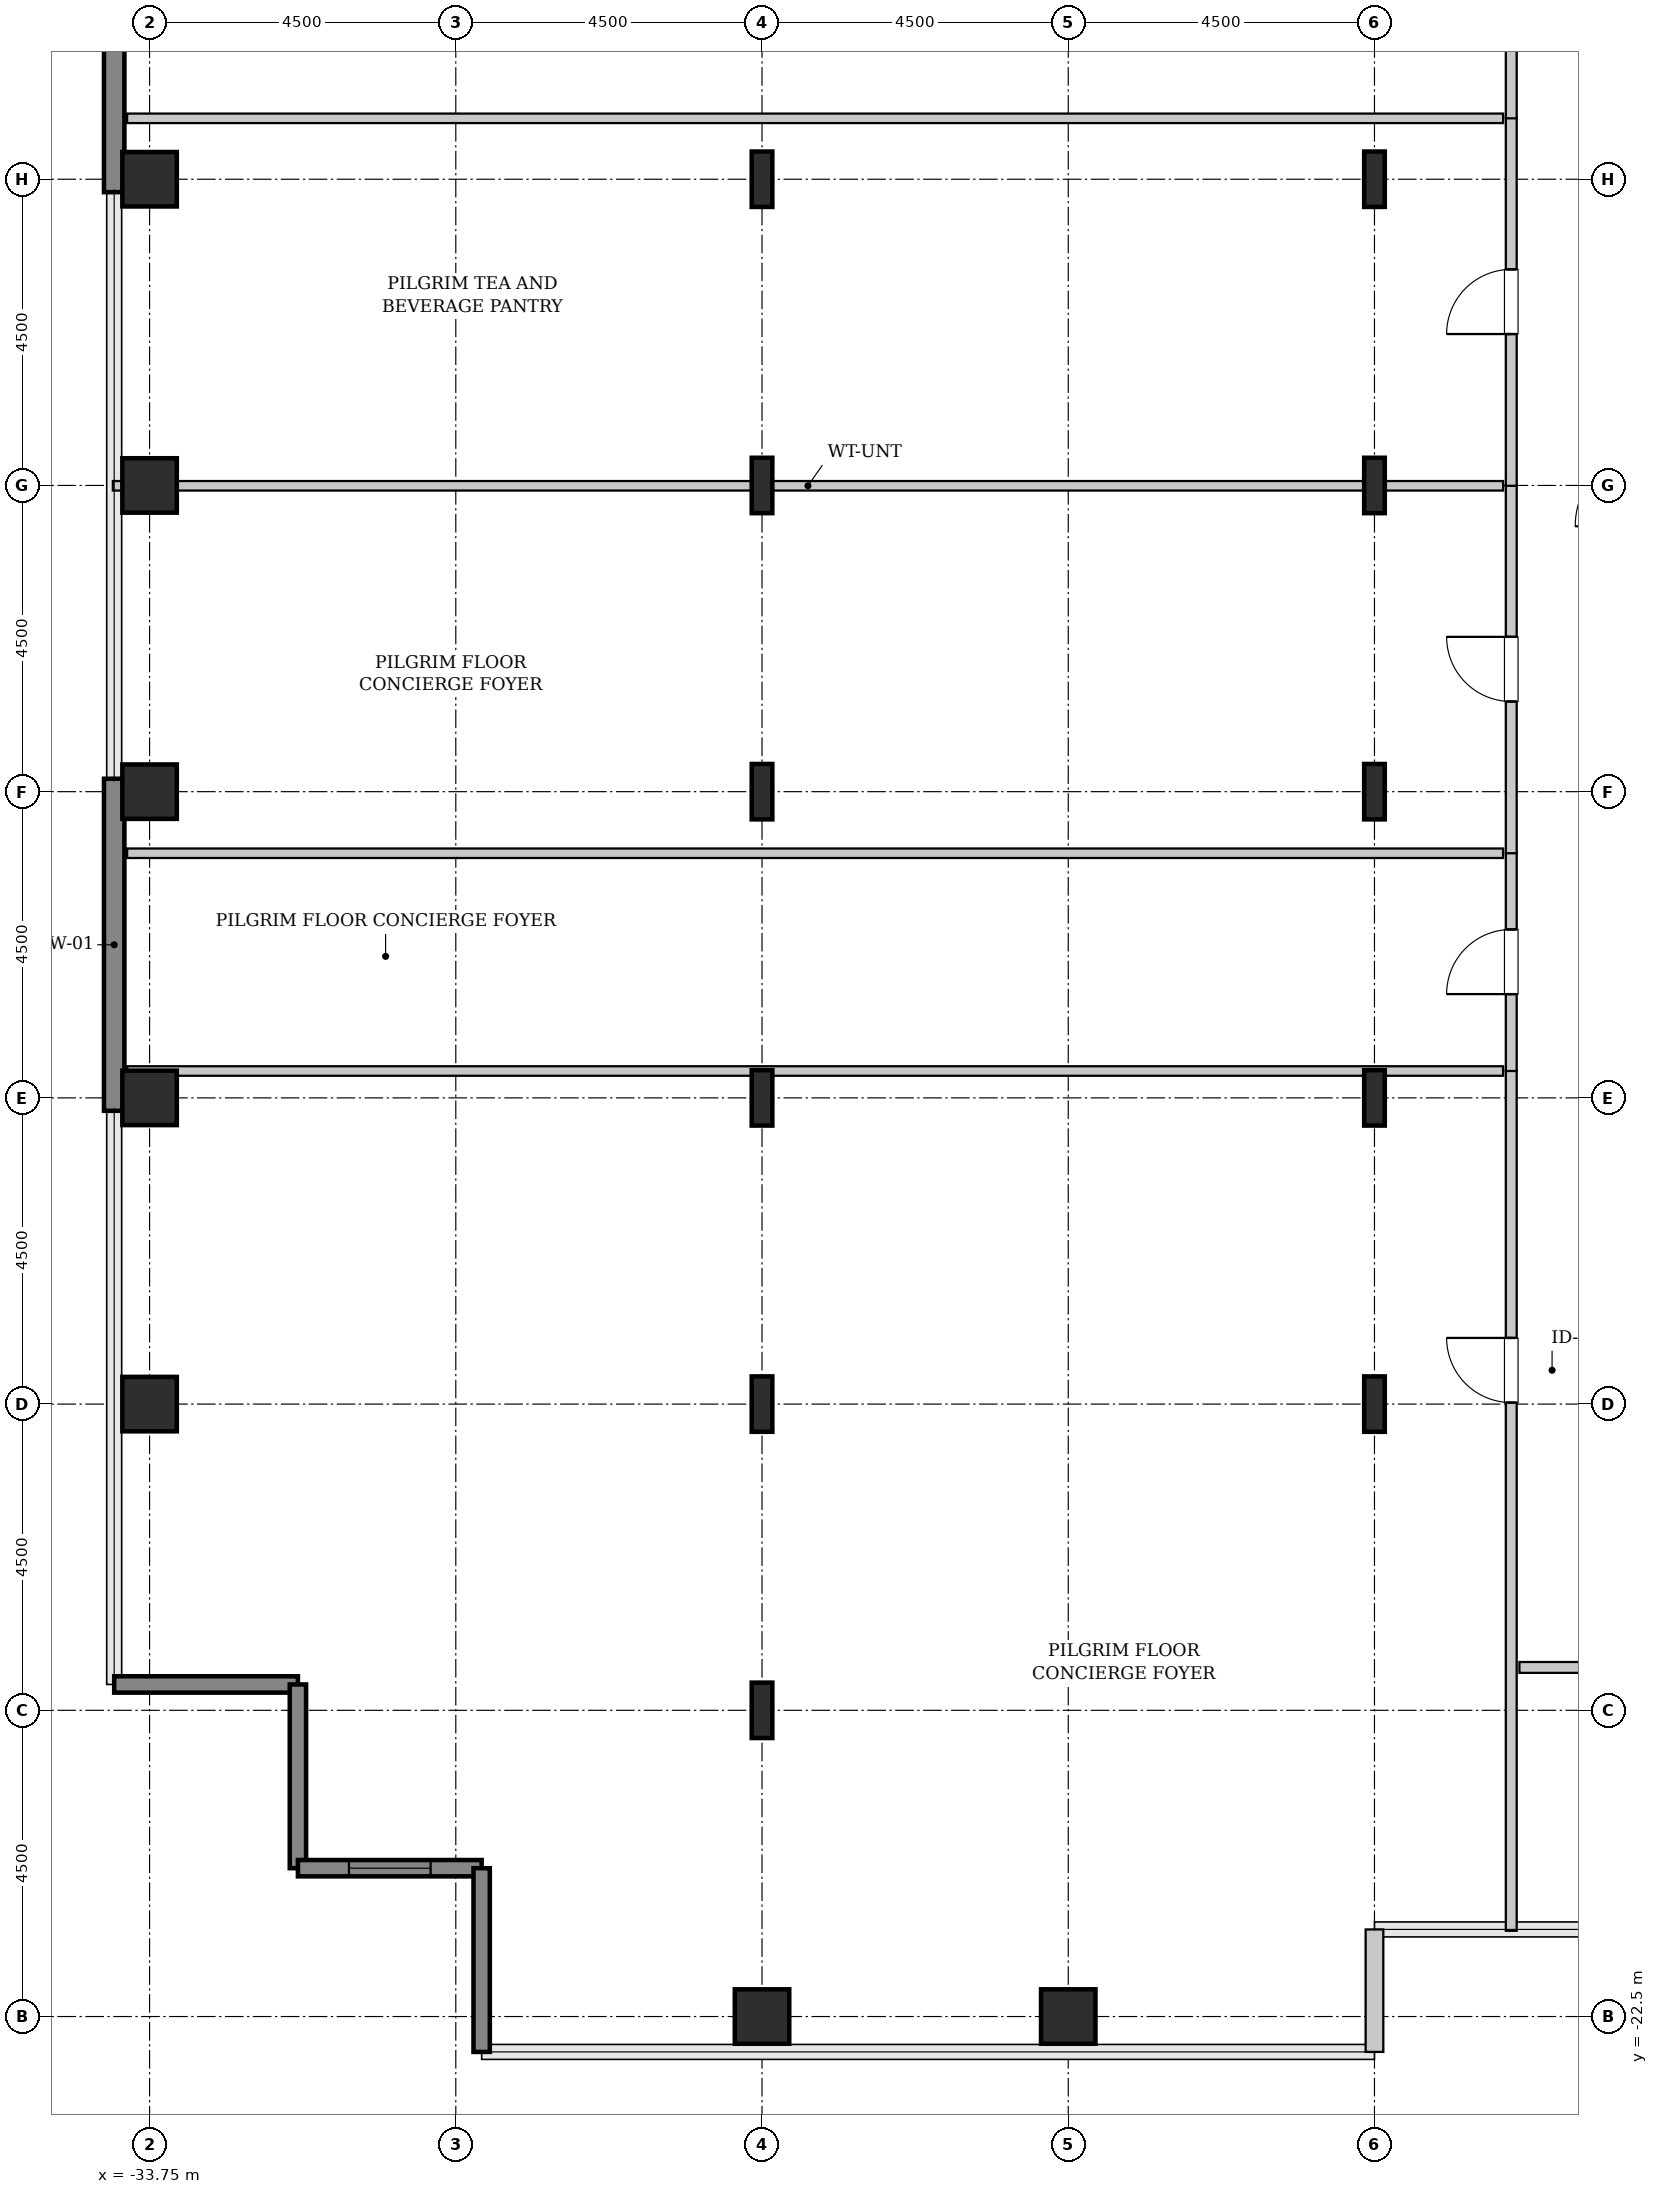
"""IFC4 building model, lengths in metres.
Left out: names, types, materials, properties, quantities, classifications, styles, units other than length and angle.
Written with IfcOpenShell. Run it as: python <this file> out.ifc"""

import sys

from ifc_helpers import new_model, si_unit, direction, frame, frame_2d, origin, origin_2d, place, context, subcontext, project, spatial, rectangle, hollow_rectangle, i_section, extrude, source, transform, mapped, element, fill, save


model = new_model("IFC4")
c1 = context("Model", 3, precision=1e-05, world=origin(), true_north=direction((0.0, 1.0)))
c2 = subcontext(c1, "Body", "Model", "MODEL_VIEW")
j1 = project(units=[si_unit("LENGTHUNIT", "METRE"), si_unit("PLANEANGLEUNIT", "RADIAN")], contexts=[c1])
p1 = place(None, origin())
s1 = spatial("IfcSite", under=j1, at=p1, CompositionType="ELEMENT")
p2 = place(p1, origin())
s2 = spatial("IfcBuilding", under=s1, at=p2, CompositionType="ELEMENT")
p3 = place(p2, frame((0.0, 0.0, 183.0)))
s3 = spatial("IfcBuildingStorey", under=s2, at=p3, CompositionType="ELEMENT", Elevation=183.0)
m1 = source(origin(), c2, "Body", "SweptSolid", [
    extrude(hollow_rectangle(XDim=0.8, YDim=0.8, WallThickness=0.04, InnerFilletRadius=0.04, OuterFilletRadius=0.08, at=origin_2d()), origin(), (0.0, 0.0, 1.0), 3.8),
])
for number, where, z_axis, x_axis in (
    (1, (-33.75, -13.5, 0.0), (0.0, 0.0, 1.0), (1.0, 0.0, 0.0)),
    (2, (-33.75, -9.0, 0.0), (0.0, 0.0, 1.0), (1.0, 0.0, 0.0)),
    (3, (-33.75, -4.5, 0.0), (0.0, 0.0, 1.0), (1.0, 0.0, 0.0)),
    (4, (-33.75, 0.0, 0.0), (0.0, 0.0, 1.0), (1.0, 0.0, 0.0)),
    (5, (-33.75, 4.5, 0.0), (0.0, 0.0, 1.0), (1.0, 0.0, 0.0)),
    (6, (-24.75, -22.5, 0.0), (0.0, 0.0, 1.0), (1.0, 0.0, 0.0)),
):
    element("IfcColumn", number, at=place(p3, frame(where, z_axis=z_axis, x_axis=x_axis)), inside=s3, PredefinedType="COLUMN", context=c2, shape_type="MappedRepresentation", body=[
        mapped(m1, transform((0.0, 0.0, 0.0), x_axis=(1.0, 0.0, 0.0), y_axis=(0.0, 1.0, 0.0), z_axis=(0.0, 0.0, 1.0), scale=1.0)),
    ])
m2 = source(origin(), c2, "Body", "SweptSolid", [
    extrude(i_section(OverallWidth=0.303, OverallDepth=0.814, WebThickness=0.021, FlangeThickness=0.04, FilletRadius=0.03, at=origin_2d()), origin(), (0.0, 0.0, 1.0), 3.8),
])
for number, where, z_axis, x_axis in (
    (7, (-24.75, -18.0, 0.0), (0.0, 0.0, 1.0), (1.0, 0.0, 0.0)),
    (8, (-24.75, -13.5, 0.0), (0.0, 0.0, 1.0), (1.0, 0.0, 0.0)),
    (9, (-24.75, -9.0, 0.0), (0.0, 0.0, 1.0), (1.0, 0.0, 0.0)),
    (10, (-24.75, -4.5, 0.0), (0.0, 0.0, 1.0), (1.0, 0.0, 0.0)),
    (11, (-24.75, 0.0, 0.0), (0.0, 0.0, 1.0), (1.0, 0.0, 0.0)),
    (12, (-24.75, 4.5, 0.0), (0.0, 0.0, 1.0), (1.0, 0.0, 0.0)),
):
    element("IfcColumn", number, at=place(p3, frame(where, z_axis=z_axis, x_axis=x_axis)), inside=s3, PredefinedType="COLUMN", context=c2, shape_type="MappedRepresentation", body=[
        mapped(m2, transform((0.0, 0.0, 0.0), x_axis=(1.0, 0.0, 0.0), y_axis=(0.0, 1.0, 0.0), z_axis=(0.0, 0.0, 1.0), scale=1.0)),
    ])
p4 = place(p3, frame((-20.25, -22.5, 0.0), z_axis=(0.0, 0.0, 1.0), x_axis=(1.0, 0.0, 0.0)))
e13 = element("IfcColumn", 13, at=p4, inside=s3, PredefinedType="COLUMN", context=c2, shape_type="MappedRepresentation", body=[
    mapped(m1, transform((0.0, 0.0, 0.0), x_axis=(1.0, 0.0, 0.0), y_axis=(0.0, 1.0, 0.0), z_axis=(0.0, 0.0, 1.0), scale=1.0)),
])
for number, where, z_axis, x_axis in (
    (14, (-15.75, -13.5, 0.0), (0.0, 0.0, 1.0), (1.0, 0.0, 0.0)),
    (15, (-15.75, -9.0, 0.0), (0.0, 0.0, 1.0), (1.0, 0.0, 0.0)),
    (16, (-15.75, -4.5, 0.0), (0.0, 0.0, 1.0), (1.0, 0.0, 0.0)),
    (17, (-15.75, 0.0, 0.0), (0.0, 0.0, 1.0), (1.0, 0.0, 0.0)),
    (18, (-15.75, 4.5, 0.0), (0.0, 0.0, 1.0), (1.0, 0.0, 0.0)),
):
    element("IfcColumn", number, at=place(p3, frame(where, z_axis=z_axis, x_axis=x_axis)), inside=s3, PredefinedType="COLUMN", context=c2, shape_type="MappedRepresentation", body=[
        mapped(m2, transform((0.0, 0.0, 0.0), x_axis=(1.0, 0.0, 0.0), y_axis=(0.0, 1.0, 0.0), z_axis=(0.0, 0.0, 1.0), scale=1.0)),
    ])
m3 = source(origin(), c2, "Body", "SweptSolid", [
    extrude(rectangle(XDim=4.88, YDim=0.3, at=frame_2d((2.44, 0.0))), origin(), (0.0, 0.0, 1.0), 3.55),
])
for number, where, z_axis, x_axis in (
    (19, (-34.27, -9.19, 0.0), (0.0, 0.0, 1.0), (0.0, 1.0, 0.0)),
    (20, (-34.27, 4.31, 0.0), (0.0, 0.0, 1.0), (0.0, 1.0, 0.0)),
):
    element("IfcWall", number, at=place(p3, frame(where, z_axis=z_axis, x_axis=x_axis)), inside=s3, PredefinedType="SHEAR", context=c2, shape_type="MappedRepresentation", body=[
        mapped(m3, transform((0.0, 0.0, 0.0), x_axis=(1.0, 0.0, 0.0), y_axis=(0.0, 1.0, 0.0), z_axis=(0.0, 0.0, 1.0), scale=1.0)),
    ])
m4 = source(origin(), c2, "Body", "SweptSolid", [
    extrude(rectangle(XDim=2.7, YDim=0.24, at=frame_2d((1.35, 0.0))), origin(), (0.0, 0.0, 1.0), 3.55),
])
for number, where, z_axis, x_axis in (
    (21, (-34.27, -17.62, 0.0), (0.0, 0.0, 1.0), (1.0, 0.0, 0.0)),
    (22, (-31.57, -17.62, 0.0), (0.0, 0.0, 1.0), (0.0, -1.0, 0.0)),
):
    element("IfcWall", number, at=place(p3, frame(where, z_axis=z_axis, x_axis=x_axis)), inside=s3, PredefinedType="SHEAR", context=c2, shape_type="MappedRepresentation", body=[
        mapped(m4, transform((0.0, 0.0, 0.0), x_axis=(1.0, 0.0, 0.0), y_axis=(0.0, 1.0, 0.0), z_axis=(0.0, 0.0, 1.0), scale=1.0)),
    ])
p5 = place(p3, frame((-31.57, -20.32, 0.0), z_axis=(0.0, 0.0, 1.0), x_axis=(1.0, 0.0, 0.0)))
e23 = element("IfcWall", 23, at=p5, inside=s3, PredefinedType="SHEAR", context=c2, shape_type="MappedRepresentation", body=[
    mapped(m4, transform((0.0, 0.0, 0.0), x_axis=(1.0, 0.0, 0.0), y_axis=(0.0, 1.0, 0.0), z_axis=(0.0, 0.0, 1.0), scale=1.0)),
])
p6 = place(p5, frame((0.75, 0.0, 0.85)))
e24 = element("IfcOpeningElement", 24, at=p6, cuts=e23, PredefinedType="OPENING", context=c2, shape_type="SweptSolid", body=[
    extrude(rectangle(XDim=1.2, YDim=1.8, at=frame_2d((0.6, 0.9))), frame((0.0, 0.13, 0.0), z_axis=(0.0, -1.0, 0.0), x_axis=(1.0, 0.0, 0.0)), (0.0, 0.0, 1.0), 0.26),
])
p7 = place(p3, frame((-28.87, -20.32, 0.0), z_axis=(0.0, 0.0, 1.0), x_axis=(0.0, -1.0, 0.0)))
e25 = element("IfcWall", 25, at=p7, inside=s3, PredefinedType="SHEAR", context=c2, shape_type="MappedRepresentation", body=[
    mapped(m4, transform((0.0, 0.0, 0.0), x_axis=(1.0, 0.0, 0.0), y_axis=(0.0, 1.0, 0.0), z_axis=(0.0, 0.0, 1.0), scale=1.0)),
])
m5 = source(origin(), c2, "Body", "SweptSolid", [
    extrude(rectangle(XDim=1.8, YDim=0.26, at=frame_2d((0.9, 0.0))), origin(), (0.0, 0.0, 1.0), 3.55),
])
p8 = place(p3, frame((-15.75, -23.02, 0.0), z_axis=(0.0, 0.0, 1.0), x_axis=(0.0, 1.0, 0.0)))
e26 = element("IfcWall", 26, at=p8, inside=s3, PredefinedType="SOLIDWALL", context=c2, shape_type="MappedRepresentation", body=[
    mapped(m5, transform((0.0, 0.0, 0.0), x_axis=(1.0, 0.0, 0.0), y_axis=(0.0, 1.0, 0.0), z_axis=(0.0, 0.0, 1.0), scale=1.0)),
])
m6 = source(origin(), c2, "Body", "SweptSolid", [
    extrude(rectangle(XDim=12.645, YDim=0.16, at=frame_2d((6.323, 0.0))), origin(), (0.0, 0.0, 1.0), 3.535),
])
p9 = place(p3, frame((-13.74, -21.24, 0.0), z_axis=(0.0, 0.0, 1.0), x_axis=(0.0, 1.0, 0.0)))
e27 = element("IfcWall", 27, at=p9, inside=s3, PredefinedType="PARTITIONING", context=c2, shape_type="MappedRepresentation", body=[
    mapped(m6, transform((0.0, 0.0, 0.0), x_axis=(1.0, 0.0, 0.0), y_axis=(0.0, 1.0, 0.0), z_axis=(0.0, 0.0, 1.0), scale=1.0)),
])
p10 = place(p9, frame((7.762, 0.0, 0.0)))
e28 = element("IfcOpeningElement", 28, at=p10, cuts=e27, PredefinedType="OPENING", context=c2, shape_type="SweptSolid", body=[
    extrude(rectangle(XDim=0.95, YDim=2.1, at=frame_2d((0.475, 1.05))), frame((0.0, 0.09, 0.0), z_axis=(0.0, -1.0, 0.0), x_axis=(1.0, 0.0, 0.0)), (0.0, 0.0, 1.0), 0.18),
])
m7 = source(origin(), c2, "Body", "SweptSolid", [
    extrude(rectangle(XDim=20.22, YDim=0.14, at=frame_2d((10.11, 0.0))), origin(), (0.0, 0.0, 1.0), 2.875),
])
p11 = place(p3, frame((-34.08, -8.605, 0.0), z_axis=(0.0, 0.0, 1.0), x_axis=(1.0, 0.0, 0.0)))
e29 = element("IfcWall", 29, at=p11, inside=s3, PredefinedType="PARTITIONING", context=c2, shape_type="MappedRepresentation", body=[
    mapped(m7, transform((0.0, 0.0, 0.0), x_axis=(1.0, 0.0, 0.0), y_axis=(0.0, 1.0, 0.0), z_axis=(0.0, 0.0, 1.0), scale=1.0)),
])
m8 = source(origin(), c2, "Body", "SweptSolid", [
    extrude(rectangle(XDim=3.21, YDim=0.16, at=frame_2d((1.605, 0.0))), origin(), (0.0, 0.0, 1.0), 3.535),
])
p12 = place(p3, frame((-13.74, -8.605, 0.0), z_axis=(0.0, 0.0, 1.0), x_axis=(0.0, 1.0, 0.0)))
e30 = element("IfcWall", 30, at=p12, inside=s3, PredefinedType="PARTITIONING", context=c2, shape_type="MappedRepresentation", body=[
    mapped(m8, transform((0.0, 0.0, 0.0), x_axis=(1.0, 0.0, 0.0), y_axis=(0.0, 1.0, 0.0), z_axis=(0.0, 0.0, 1.0), scale=1.0)),
])
p13 = place(p12, frame((1.13, 0.0, 0.0)))
e31 = element("IfcOpeningElement", 31, at=p13, cuts=e30, PredefinedType="OPENING", context=c2, shape_type="SweptSolid", body=[
    extrude(rectangle(XDim=0.95, YDim=2.1, at=frame_2d((0.475, 1.05))), frame((0.0, 0.09, 0.0), z_axis=(0.0, -1.0, 0.0), x_axis=(1.0, 0.0, 0.0)), (0.0, 0.0, 1.0), 0.18),
])
m9 = source(origin(), c2, "Body", "SweptSolid", [
    extrude(rectangle(XDim=20.22, YDim=0.14, at=frame_2d((10.11, 0.0))), origin(), (0.0, 0.0, 1.0), 3.535),
])
p14 = place(p3, frame((-34.08, -5.405, 0.0), z_axis=(0.0, 0.0, 1.0), x_axis=(1.0, 0.0, 0.0)))
e32 = element("IfcWall", 32, at=p14, inside=s3, PredefinedType="PARTITIONING", context=c2, shape_type="MappedRepresentation", body=[
    mapped(m9, transform((0.0, 0.0, 0.0), x_axis=(1.0, 0.0, 0.0), y_axis=(0.0, 1.0, 0.0), z_axis=(0.0, 0.0, 1.0), scale=1.0)),
])
m10 = source(origin(), c2, "Body", "SweptSolid", [
    extrude(rectangle(XDim=5.41, YDim=0.16, at=frame_2d((2.705, 0.0))), origin(), (0.0, 0.0, 1.0), 3.535),
])
p15 = place(p3, frame((-13.74, -5.405, 0.0), z_axis=(0.0, 0.0, 1.0), x_axis=(0.0, 1.0, 0.0)))
e33 = element("IfcWall", 33, at=p15, inside=s3, PredefinedType="PARTITIONING", context=c2, shape_type="MappedRepresentation", body=[
    mapped(m10, transform((0.0, 0.0, 0.0), x_axis=(1.0, 0.0, 0.0), y_axis=(0.0, 1.0, 0.0), z_axis=(0.0, 0.0, 1.0), scale=1.0)),
])
p16 = place(p15, frame((2.23, 0.0, 0.0)))
e34 = element("IfcOpeningElement", 34, at=p16, cuts=e33, PredefinedType="OPENING", context=c2, shape_type="SweptSolid", body=[
    extrude(rectangle(XDim=0.95, YDim=2.1, at=frame_2d((0.475, 1.05))), frame((0.0, 0.09, 0.0), z_axis=(0.0, -1.0, 0.0), x_axis=(1.0, 0.0, 0.0)), (0.0, 0.0, 1.0), 0.18),
])
m11 = source(origin(), c2, "Body", "SweptSolid", [
    extrude(rectangle(XDim=20.43, YDim=0.14, at=frame_2d((10.215, 0.0))), origin(), (0.0, 0.0, 1.0), 2.875),
])
p17 = place(p3, frame((-34.29, -0.005, 0.0), z_axis=(0.0, 0.0, 1.0), x_axis=(1.0, 0.0, 0.0)))
e35 = element("IfcWall", 35, at=p17, inside=s3, PredefinedType="PARTITIONING", context=c2, shape_type="MappedRepresentation", body=[
    mapped(m11, transform((0.0, 0.0, 0.0), x_axis=(1.0, 0.0, 0.0), y_axis=(0.0, 1.0, 0.0), z_axis=(0.0, 0.0, 1.0), scale=1.0)),
])
p18 = place(p3, frame((-13.74, -0.005, 0.0), z_axis=(0.0, 0.0, 1.0), x_axis=(0.0, 1.0, 0.0)))
e36 = element("IfcWall", 36, at=p18, inside=s3, PredefinedType="PARTITIONING", context=c2, shape_type="MappedRepresentation", body=[
    mapped(m10, transform((0.0, 0.0, 0.0), x_axis=(1.0, 0.0, 0.0), y_axis=(0.0, 1.0, 0.0), z_axis=(0.0, 0.0, 1.0), scale=1.0)),
])
p19 = place(p18, frame((2.23, 0.0, 0.0)))
e37 = element("IfcOpeningElement", 37, at=p19, cuts=e36, PredefinedType="OPENING", context=c2, shape_type="SweptSolid", body=[
    extrude(rectangle(XDim=0.95, YDim=2.1, at=frame_2d((0.475, 1.05))), frame((0.0, 0.09, 0.0), z_axis=(0.0, -1.0, 0.0), x_axis=(1.0, 0.0, 0.0)), (0.0, 0.0, 1.0), 0.18),
])
p20 = place(p3, frame((-34.08, 5.395, 0.0), z_axis=(0.0, 0.0, 1.0), x_axis=(1.0, 0.0, 0.0)))
e38 = element("IfcWall", 38, at=p20, inside=s3, PredefinedType="PARTITIONING", context=c2, shape_type="MappedRepresentation", body=[
    mapped(m9, transform((0.0, 0.0, 0.0), x_axis=(1.0, 0.0, 0.0), y_axis=(0.0, 1.0, 0.0), z_axis=(0.0, 0.0, 1.0), scale=1.0)),
])
p21 = place(p3, frame((-13.74, 5.395, 0.0), z_axis=(0.0, 0.0, 1.0), x_axis=(0.0, 1.0, 0.0)))
e39 = element("IfcWall", 39, at=p21, inside=s3, PredefinedType="PARTITIONING", context=c2, shape_type="MappedRepresentation", body=[
    mapped(m8, transform((0.0, 0.0, 0.0), x_axis=(1.0, 0.0, 0.0), y_axis=(0.0, 1.0, 0.0), z_axis=(0.0, 0.0, 1.0), scale=1.0)),
])
p22 = place(p21, frame((1.13, 0.0, 0.0)))
e40 = element("IfcOpeningElement", 40, at=p22, cuts=e39, PredefinedType="OPENING", context=c2, shape_type="SweptSolid", body=[
    extrude(rectangle(XDim=0.95, YDim=2.1, at=frame_2d((0.475, 1.05))), frame((0.0, 0.09, 0.0), z_axis=(0.0, -1.0, 0.0), x_axis=(1.0, 0.0, 0.0)), (0.0, 0.0, 1.0), 0.18),
])
m12 = source(origin(), c2, "Body", "SweptSolid", [
    extrude(rectangle(XDim=7.225, YDim=0.16, at=frame_2d((3.613, 0.0))), origin(), (0.0, 0.0, 1.0), 3.535),
])
p23 = place(p3, frame((-13.62, -17.37, 0.0), z_axis=(0.0, 0.0, 1.0), x_axis=(1.0, 0.0, 0.0)))
e41 = element("IfcWall", 41, at=p23, inside=s3, PredefinedType="PARTITIONING", context=c2, shape_type="MappedRepresentation", body=[
    mapped(m12, transform((0.0, 0.0, 0.0), x_axis=(1.0, 0.0, 0.0), y_axis=(0.0, 1.0, 0.0), z_axis=(0.0, 0.0, 1.0), scale=1.0)),
])
p24 = place(p23, frame((3.137, 0.0, 0.0)))
e42 = element("IfcOpeningElement", 42, at=p24, cuts=e41, PredefinedType="OPENING", context=c2, shape_type="SweptSolid", body=[
    extrude(rectangle(XDim=0.95, YDim=2.1, at=frame_2d((0.475, 1.05))), frame((0.0, 0.09, 0.0), z_axis=(0.0, -1.0, 0.0), x_axis=(1.0, 0.0, 0.0)), (0.0, 0.0, 1.0), 0.18),
])
m13 = source(origin(), c2, "Body", "SweptSolid", [
    extrude(rectangle(XDim=1.2, YDim=1.8, at=frame_2d((0.6, 0.9))), frame((0.0, 0.03, 0.0), z_axis=(0.0, -1.0, 0.0), x_axis=(1.0, 0.0, 0.0)), (0.0, 0.0, 1.0), 0.06),
])
p25 = place(p6, origin())
e43 = element("IfcWindow", 43, at=p25, inside=s3, PartitioningType="SINGLE_PANEL", PredefinedType="WINDOW", context=c2, shape_type="MappedRepresentation", body=[
    mapped(m13, transform((0.0, 0.0, 0.0), x_axis=(1.0, 0.0, 0.0), y_axis=(0.0, 1.0, 0.0), z_axis=(0.0, 0.0, 1.0), scale=1.0)),
])
fill(e24, e43)
m14 = source(origin(), c2, "Body", "SweptSolid", [
    extrude(rectangle(XDim=0.95, YDim=2.1, at=frame_2d((0.475, 1.05))), frame((0.0, 0.025, 0.0), z_axis=(0.0, -1.0, 0.0), x_axis=(1.0, 0.0, 0.0)), (0.0, 0.0, 1.0), 0.05),
])
p26 = place(p10, origin())
e44 = element("IfcDoor", 44, at=p26, inside=s3, OperationType="SINGLE_SWING_RIGHT", PredefinedType="DOOR", context=c2, shape_type="MappedRepresentation", body=[
    mapped(m14, transform((0.0, 0.0, 0.0), x_axis=(1.0, 0.0, 0.0), y_axis=(0.0, 1.0, 0.0), z_axis=(0.0, 0.0, 1.0), scale=1.0)),
])
fill(e28, e44)
p27 = place(p13, origin())
e45 = element("IfcDoor", 45, at=p27, inside=s3, OperationType="SINGLE_SWING_LEFT", PredefinedType="DOOR", context=c2, shape_type="MappedRepresentation", body=[
    mapped(m14, transform((0.0, 0.0, 0.0), x_axis=(1.0, 0.0, 0.0), y_axis=(0.0, 1.0, 0.0), z_axis=(0.0, 0.0, 1.0), scale=1.0)),
])
fill(e31, e45)
p28 = place(p16, origin())
e46 = element("IfcDoor", 46, at=p28, inside=s3, OperationType="SINGLE_SWING_RIGHT", PredefinedType="DOOR", context=c2, shape_type="MappedRepresentation", body=[
    mapped(m14, transform((0.0, 0.0, 0.0), x_axis=(1.0, 0.0, 0.0), y_axis=(0.0, 1.0, 0.0), z_axis=(0.0, 0.0, 1.0), scale=1.0)),
])
fill(e34, e46)
p29 = place(p19, origin())
e47 = element("IfcDoor", 47, at=p29, inside=s3, OperationType="SINGLE_SWING_LEFT", PredefinedType="DOOR", context=c2, shape_type="MappedRepresentation", body=[
    mapped(m14, transform((0.0, 0.0, 0.0), x_axis=(1.0, 0.0, 0.0), y_axis=(0.0, 1.0, 0.0), z_axis=(0.0, 0.0, 1.0), scale=1.0)),
])
fill(e37, e47)
save(model, sys.argv[1])
